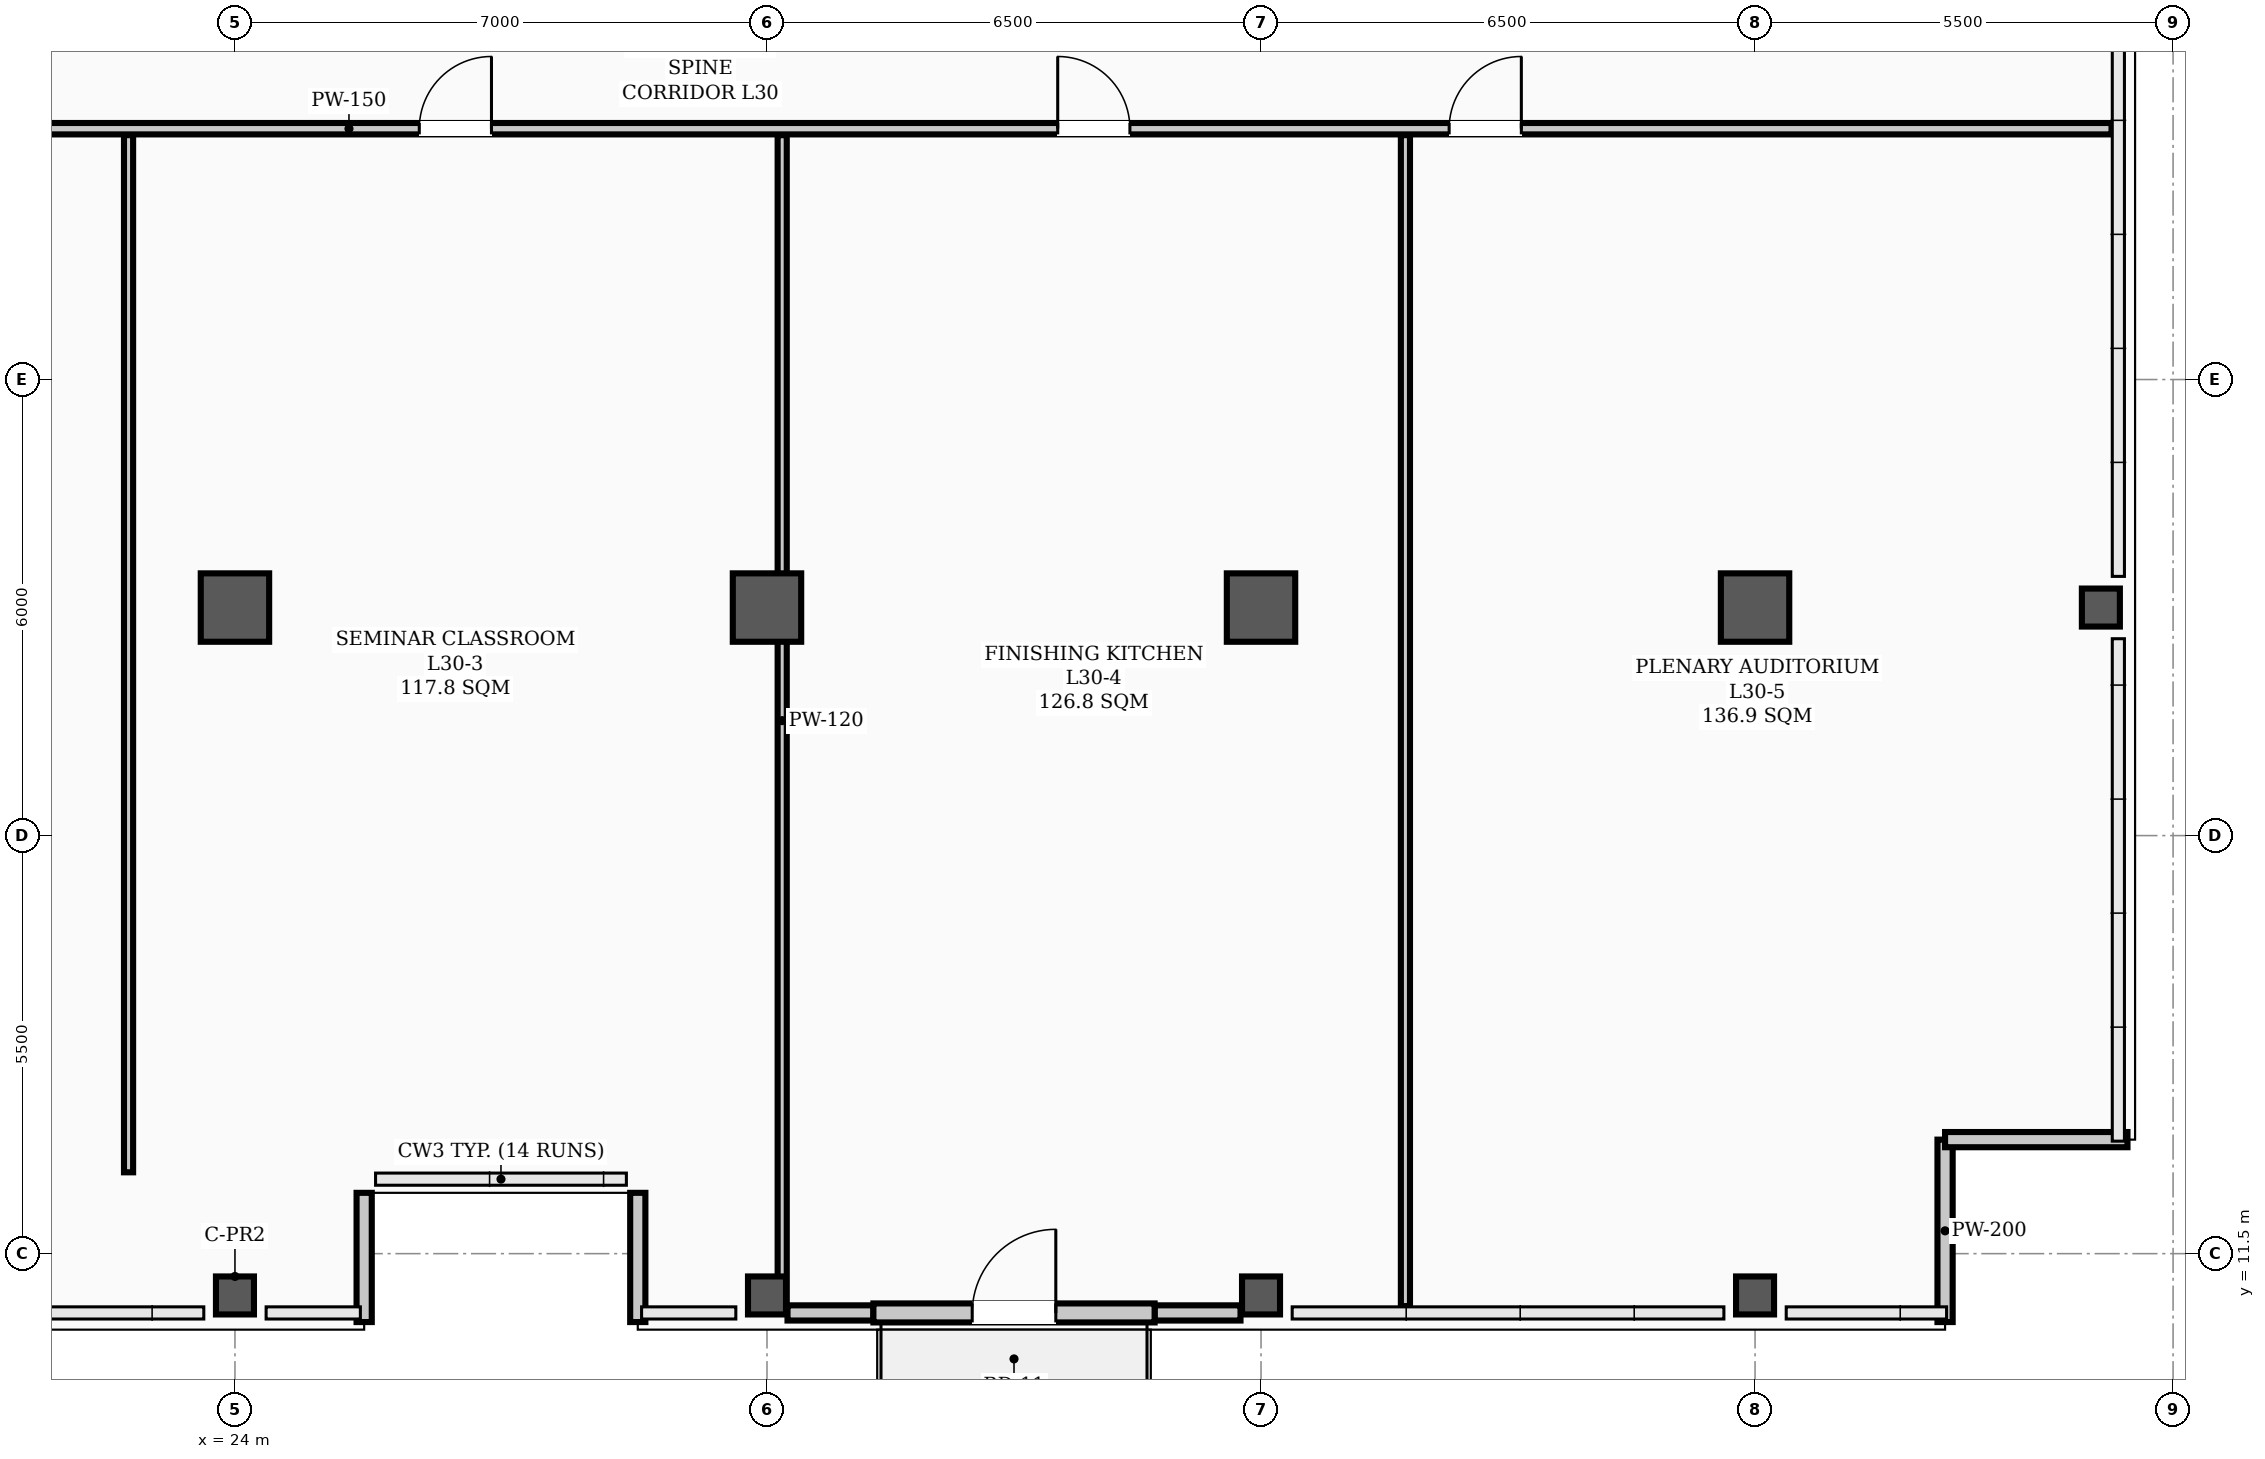
"""IFC4 building model, lengths in metres.
Left out: names, types, materials, properties, quantities, classifications, styles, units other than length and angle.
Written with IfcOpenShell. Run it as: python <this file> out.ifc"""

import sys

from ifc_helpers import new_model, si_unit, direction, frame, frame_2d, origin, origin_2d, place, context, subcontext, project, spatial, rectangle, hollow_rectangle, extrude, element, fill, save


model = new_model("IFC4")
c1 = context("Model", 3, precision=1e-05, world=origin(), true_north=direction((0.0, 1.0)))
c2 = subcontext(c1, "Body", "Model", "MODEL_VIEW")
j1 = project(units=[si_unit("LENGTHUNIT", "METRE"), si_unit("PLANEANGLEUNIT", "RADIAN")], contexts=[c1])
p1 = place(None, origin())
s1 = spatial("IfcSite", under=j1, at=p1, CompositionType="ELEMENT")
p2 = place(p1, origin())
s2 = spatial("IfcBuilding", under=s1, at=p2, CompositionType="ELEMENT")
p3 = place(p2, frame((0.0, 0.0, 122.7)))
s3 = spatial("IfcBuildingStorey", under=s2, at=p3, CompositionType="ELEMENT", Elevation=122.7)
for number, where, z_axis, x_axis in (
    (1, (24.0, 20.0, 0.0), (0.0, 0.0, 1.0), (1.0, 0.0, 0.0)),
    (2, (31.0, 20.0, 0.0), (0.0, 0.0, 1.0), (1.0, 0.0, 0.0)),
    (3, (37.5, 20.0, 0.0), (0.0, 0.0, 1.0), (1.0, 0.0, 0.0)),
    (4, (44.0, 20.0, 0.0), (0.0, 0.0, 1.0), (1.0, 0.0, 0.0)),
):
    element("IfcColumn", number, at=place(p3, frame(where, z_axis=z_axis, x_axis=x_axis)), inside=s3, PredefinedType="COLUMN", context=c2, shape_type="SweptSolid", body=[
        extrude(hollow_rectangle(XDim=0.9, YDim=0.9, WallThickness=0.035, InnerFilletRadius=0.017, OuterFilletRadius=0.052, at=origin_2d()), origin(), (0.0, 0.0, 1.0), 3.9),
    ])
for number, where, z_axis, x_axis in (
    (5, (24.0, 10.95, 0.0), (0.0, 0.0, 1.0), (1.0, 0.0, 0.0)),
    (6, (31.0, 10.95, 0.0), (0.0, 0.0, 1.0), (1.0, 0.0, 0.0)),
    (7, (37.5, 10.95, 0.0), (0.0, 0.0, 1.0), (1.0, 0.0, 0.0)),
    (8, (44.0, 10.95, 0.0), (0.0, 0.0, 1.0), (1.0, 0.0, 0.0)),
    (9, (48.55, 20.0, 0.0), (0.0, 0.0, 1.0), (1.0, 0.0, 0.0)),
):
    element("IfcColumn", number, at=place(p3, frame(where, z_axis=z_axis, x_axis=x_axis)), inside=s3, PredefinedType="COLUMN", context=c2, shape_type="SweptSolid", body=[
        extrude(hollow_rectangle(XDim=0.5, YDim=0.5, WallThickness=0.024, InnerFilletRadius=0.012, OuterFilletRadius=0.036, at=origin_2d()), origin(), (0.0, 0.0, 1.0), 3.9),
    ])
for number, where, z_axis, x_axis in (
    (10, (31.27, 10.72, 0.0), (0.0, 0.0, 1.0), (1.0, 0.0, 0.0)),
    (11, (36.1, 10.72, 0.0), (0.0, 0.0, 1.0), (1.0, 0.0, 0.0)),
):
    element("IfcWall", number, at=place(p3, frame(where, z_axis=z_axis, x_axis=x_axis)), inside=s3, PredefinedType="PARAPET", context=c2, shape_type="SweptSolid", body=[
        extrude(rectangle(XDim=1.13, YDim=0.2, at=frame_2d((0.565, 0.0))), origin(), (0.0, 0.0, 1.0), 1.2),
    ])
for number, where, z_axis, x_axis in (
    (12, (46.5, 10.6, 0.0), (0.0, 0.0, 1.0), (0.0, 1.0, 0.0)),
    (13, (46.5, 13.0, 0.0), (0.0, 0.0, 1.0), (1.0, 0.0, 0.0)),
):
    element("IfcWall", number, at=place(p3, frame(where, z_axis=z_axis, x_axis=x_axis)), inside=s3, PredefinedType="PARAPET", context=c2, shape_type="SweptSolid", body=[
        extrude(rectangle(XDim=2.4, YDim=0.2, at=frame_2d((1.2, 0.0))), origin(), (0.0, 0.0, 1.0), 1.2),
    ])
for number, where, z_axis, x_axis in (
    (14, (25.7, 10.6, 0.0), (0.0, 0.0, 1.0), (0.0, 1.0, 0.0)),
    (15, (29.3, 12.3, 0.0), (0.0, 0.0, 1.0), (0.0, -1.0, 0.0)),
):
    element("IfcWall", number, at=place(p3, frame(where, z_axis=z_axis, x_axis=x_axis)), inside=s3, PredefinedType="PARAPET", context=c2, shape_type="SweptSolid", body=[
        extrude(rectangle(XDim=1.7, YDim=0.2, at=frame_2d((0.85, 0.0))), origin(), (0.0, 0.0, 1.0), 1.2),
    ])
p4 = place(p3, frame((32.4, 10.72, 0.0), z_axis=(0.0, 0.0, 1.0), x_axis=(1.0, 0.0, 0.0)))
e16 = element("IfcWall", 16, at=p4, inside=s3, PredefinedType="STANDARD", context=c2, shape_type="SweptSolid", body=[
    extrude(rectangle(XDim=3.7, YDim=0.25, at=frame_2d((1.85, 0.0))), origin(), (0.0, 0.0, 1.0), 3.18),
])
p5 = place(p4, frame((1.3, 0.0, 0.0)))
e17 = element("IfcOpeningElement", 17, at=p5, cuts=e16, PredefinedType="OPENING", context=c2, shape_type="SweptSolid", body=[
    extrude(rectangle(XDim=1.1, YDim=2.2, at=frame_2d((0.55, 1.1))), frame((0.0, 0.135, 0.0), z_axis=(0.0, -1.0, 0.0), x_axis=(1.0, 0.0, 0.0)), (0.0, 0.0, 1.0), 0.27),
])
p6 = place(p3, frame((2.31, 26.3, 0.0), z_axis=(0.0, 0.0, 1.0), x_axis=(1.0, 0.0, 0.0)))
e18 = element("IfcWall", 18, at=p6, inside=s3, PredefinedType="PARTITIONING", context=c2, shape_type="SweptSolid", body=[
    extrude(rectangle(XDim=46.38, YDim=0.15, at=frame_2d((23.19, 0.0))), origin(), (0.0, 0.0, 1.0), 3.1),
])
p7 = place(p6, frame((10.19, 0.0, 0.0)))
e19 = element("IfcOpeningElement", 19, at=p7, cuts=e18, PredefinedType="OPENING", context=c2, shape_type="SweptSolid", body=[
    extrude(rectangle(XDim=0.95, YDim=2.08, at=frame_2d((0.475, 1.04))), frame((0.0, 0.085, 0.0), z_axis=(0.0, -1.0, 0.0), x_axis=(1.0, 0.0, 0.0)), (0.0, 0.0, 1.0), 0.17),
])
p8 = place(p6, frame((15.915, 0.0, 0.0)))
e20 = element("IfcOpeningElement", 20, at=p8, cuts=e18, PredefinedType="OPENING", context=c2, shape_type="SweptSolid", body=[
    extrude(rectangle(XDim=0.95, YDim=2.08, at=frame_2d((0.475, 1.04))), frame((0.0, 0.085, 0.0), z_axis=(0.0, -1.0, 0.0), x_axis=(1.0, 0.0, 0.0)), (0.0, 0.0, 1.0), 0.17),
])
p9 = place(p6, frame((24.115, 0.0, 0.0)))
e21 = element("IfcOpeningElement", 21, at=p9, cuts=e18, PredefinedType="OPENING", context=c2, shape_type="SweptSolid", body=[
    extrude(rectangle(XDim=0.95, YDim=2.08, at=frame_2d((0.475, 1.04))), frame((0.0, 0.085, 0.0), z_axis=(0.0, -1.0, 0.0), x_axis=(1.0, 0.0, 0.0)), (0.0, 0.0, 1.0), 0.17),
])
p10 = place(p6, frame((32.515, 0.0, 0.0)))
e22 = element("IfcOpeningElement", 22, at=p10, cuts=e18, PredefinedType="OPENING", context=c2, shape_type="SweptSolid", body=[
    extrude(rectangle(XDim=0.95, YDim=2.08, at=frame_2d((0.475, 1.04))), frame((0.0, 0.085, 0.0), z_axis=(0.0, -1.0, 0.0), x_axis=(1.0, 0.0, 0.0)), (0.0, 0.0, 1.0), 0.17),
])
p11 = place(p6, frame((37.665, 0.0, 0.0)))
e23 = element("IfcOpeningElement", 23, at=p11, cuts=e18, PredefinedType="OPENING", context=c2, shape_type="SweptSolid", body=[
    extrude(rectangle(XDim=0.95, YDim=2.08, at=frame_2d((0.475, 1.04))), frame((0.0, 0.085, 0.0), z_axis=(0.0, -1.0, 0.0), x_axis=(1.0, 0.0, 0.0)), (0.0, 0.0, 1.0), 0.17),
])
p12 = place(p3, frame((22.6, 12.57, 0.0), z_axis=(0.0, 0.0, 1.0), x_axis=(0.0, 1.0, 0.0)))
e24 = element("IfcWall", 24, at=p12, inside=s3, PredefinedType="PARTITIONING", context=c2, shape_type="SweptSolid", body=[
    extrude(rectangle(XDim=13.645, YDim=0.12, at=frame_2d((6.823, 0.0))), origin(), (0.0, 0.0, 1.0), 3.0),
])
for number, where, z_axis, x_axis in (
    (25, (31.2, 10.81, 0.0), (0.0, 0.0, 1.0), (0.0, 1.0, 0.0)),
    (26, (39.4, 10.81, 0.0), (0.0, 0.0, 1.0), (0.0, 1.0, 0.0)),
):
    element("IfcWall", number, at=place(p3, frame(where, z_axis=z_axis, x_axis=x_axis)), inside=s3, PredefinedType="PARTITIONING", context=c2, shape_type="SweptSolid", body=[
        extrude(rectangle(XDim=15.405, YDim=0.12, at=frame_2d((7.703, 0.0))), origin(), (0.0, 0.0, 1.0), 3.0),
    ])
p13 = place(p5, origin())
e27 = element("IfcDoor", 27, at=p13, inside=s3, OperationType="SINGLE_SWING_RIGHT", PredefinedType="DOOR", context=c2, shape_type="SweptSolid", body=[
    extrude(rectangle(XDim=1.1, YDim=2.2, at=frame_2d((0.55, 1.1))), frame((0.0, 0.025, 0.0), z_axis=(0.0, -1.0, 0.0), x_axis=(1.0, 0.0, 0.0)), (0.0, 0.0, 1.0), 0.05),
])
fill(e17, e27)
p14 = place(p9, origin())
e28 = element("IfcDoor", 28, at=p14, inside=s3, OperationType="SINGLE_SWING_RIGHT", PredefinedType="DOOR", context=c2, shape_type="SweptSolid", body=[
    extrude(rectangle(XDim=0.95, YDim=2.08, at=frame_2d((0.475, 1.04))), frame((0.0, 0.025, 0.0), z_axis=(0.0, -1.0, 0.0), x_axis=(1.0, 0.0, 0.0)), (0.0, 0.0, 1.0), 0.05),
])
fill(e21, e28)
p15 = place(p10, origin())
e29 = element("IfcDoor", 29, at=p15, inside=s3, OperationType="SINGLE_SWING_LEFT", PredefinedType="DOOR", context=c2, shape_type="SweptSolid", body=[
    extrude(rectangle(XDim=0.95, YDim=2.08, at=frame_2d((0.475, 1.04))), frame((0.0, 0.025, 0.0), z_axis=(0.0, -1.0, 0.0), x_axis=(1.0, 0.0, 0.0)), (0.0, 0.0, 1.0), 0.05),
])
fill(e22, e29)
p16 = place(p11, origin())
e30 = element("IfcDoor", 30, at=p16, inside=s3, OperationType="SINGLE_SWING_RIGHT", PredefinedType="DOOR", context=c2, shape_type="SweptSolid", body=[
    extrude(rectangle(XDim=0.95, YDim=2.08, at=frame_2d((0.475, 1.04))), frame((0.0, 0.025, 0.0), z_axis=(0.0, -1.0, 0.0), x_axis=(1.0, 0.0, 0.0)), (0.0, 0.0, 1.0), 0.05),
])
fill(e23, e30)
save(model, sys.argv[1])
